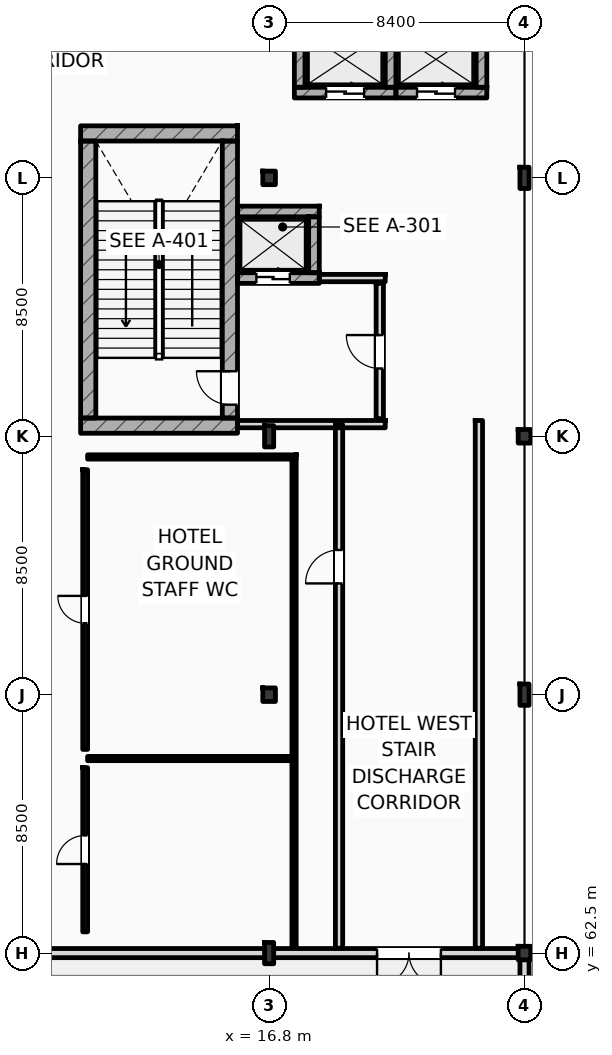
"""IFC4 building model, lengths in metres.
Left out: names, types, materials, properties, quantities, classifications, styles, units other than length and angle.
Written with IfcOpenShell. Run it as: python <this file> out.ifc"""

import sys

from ifc_helpers import new_model, si_unit, direction, frame, frame_2d, origin, origin_2d, place, context, subcontext, project, spatial, rectangle, i_section, extrude, element, fill, save


model = new_model("IFC4")
c1 = context("Model", 3, precision=1e-05, world=origin(), true_north=direction((0.0, 1.0)))
c2 = subcontext(c1, "Body", "Model", "MODEL_VIEW")
j1 = project(units=[si_unit("LENGTHUNIT", "METRE"), si_unit("PLANEANGLEUNIT", "RADIAN")], contexts=[c1])
p1 = place(None, origin())
s1 = spatial("IfcSite", under=j1, at=p1, CompositionType="ELEMENT")
p2 = place(p1, origin())
s2 = spatial("IfcBuilding", under=s1, at=p2, CompositionType="ELEMENT")
p3 = place(p2, origin())
s3 = spatial("IfcBuildingStorey", under=s2, at=p3, CompositionType="ELEMENT", Elevation=0.0)
p4 = place(p3, frame((16.8, 62.5, 0.0), z_axis=(0.0, 0.0, 1.0), x_axis=(1.0, 0.0, 0.0)))
e1 = element("IfcColumn", 1, at=p4, inside=s3, PredefinedType="COLUMN", context=c2, shape_type="SweptSolid", body=[
    extrude(i_section(OverallWidth=0.3, OverallDepth=0.7, WebThickness=0.017, FlangeThickness=0.032, FilletRadius=0.027, at=origin_2d()), origin(), (0.0, 0.0, 1.0), 6.0),
])
p5 = place(p3, frame((16.8, 71.0, 0.0), z_axis=(0.0, 0.0, 1.0), x_axis=(1.0, 0.0, 0.0)))
e2 = element("IfcColumn", 2, at=p5, inside=s3, PredefinedType="COLUMN", context=c2, shape_type="SweptSolid", body=[
    extrude(i_section(OverallWidth=0.416, OverallDepth=0.446, WebThickness=0.036, FlangeThickness=0.048, FilletRadius=0.015, at=origin_2d()), origin(), (0.0, 0.0, 1.0), 6.0),
])
p6 = place(p3, frame((16.8, 79.5, 0.0), z_axis=(0.0, 0.0, 1.0), x_axis=(1.0, 0.0, 0.0)))
e3 = element("IfcColumn", 3, at=p6, inside=s3, PredefinedType="COLUMN", context=c2, shape_type="SweptSolid", body=[
    extrude(i_section(OverallWidth=0.3, OverallDepth=0.7, WebThickness=0.017, FlangeThickness=0.032, FilletRadius=0.027, at=origin_2d()), origin(), (0.0, 0.0, 1.0), 6.0),
])
for number, where, z_axis, x_axis in (
    (4, (16.8, 88.0, 0.0), (0.0, 0.0, 1.0), (1.0, 0.0, 0.0)),
    (5, (25.2, 62.5, 0.0), (0.0, 0.0, 1.0), (1.0, 0.0, 0.0)),
):
    element("IfcColumn", number, at=place(p3, frame(where, z_axis=z_axis, x_axis=x_axis)), inside=s3, PredefinedType="COLUMN", context=c2, shape_type="SweptSolid", body=[
        extrude(i_section(OverallWidth=0.416, OverallDepth=0.446, WebThickness=0.036, FlangeThickness=0.048, FilletRadius=0.015, at=origin_2d()), origin(), (0.0, 0.0, 1.0), 6.0),
    ])
p7 = place(p3, frame((25.2, 71.0, 0.0), z_axis=(0.0, 0.0, 1.0), x_axis=(1.0, 0.0, 0.0)))
e6 = element("IfcColumn", 6, at=p7, inside=s3, PredefinedType="COLUMN", context=c2, shape_type="SweptSolid", body=[
    extrude(i_section(OverallWidth=0.3, OverallDepth=0.7, WebThickness=0.017, FlangeThickness=0.032, FilletRadius=0.027, at=origin_2d()), origin(), (0.0, 0.0, 1.0), 6.0),
])
p8 = place(p3, frame((25.2, 79.5, 0.0), z_axis=(0.0, 0.0, 1.0), x_axis=(1.0, 0.0, 0.0)))
e7 = element("IfcColumn", 7, at=p8, inside=s3, PredefinedType="COLUMN", context=c2, shape_type="SweptSolid", body=[
    extrude(i_section(OverallWidth=0.416, OverallDepth=0.446, WebThickness=0.036, FlangeThickness=0.048, FilletRadius=0.015, at=origin_2d()), origin(), (0.0, 0.0, 1.0), 6.0),
])
p9 = place(p3, frame((25.2, 88.0, 0.0), z_axis=(0.0, 0.0, 1.0), x_axis=(1.0, 0.0, 0.0)))
e8 = element("IfcColumn", 8, at=p9, inside=s3, PredefinedType="COLUMN", context=c2, shape_type="SweptSolid", body=[
    extrude(i_section(OverallWidth=0.3, OverallDepth=0.7, WebThickness=0.017, FlangeThickness=0.032, FilletRadius=0.027, at=origin_2d()), origin(), (0.0, 0.0, 1.0), 6.0),
])
for number, where, z_axis, x_axis in (
    (9, (10.6, 89.462, 0.0), (0.0, 0.0, 1.0), (1.0, 0.0, 0.0)),
    (10, (10.6, 79.85, 0.0), (0.0, 0.0, 1.0), (1.0, 0.0, 0.0)),
):
    element("IfcWall", number, at=place(p3, frame(where, z_axis=z_axis, x_axis=x_axis)), inside=s3, PredefinedType="SHEAR", context=c2, shape_type="SweptSolid", body=[
        extrude(rectangle(XDim=5.16, YDim=0.5, at=frame_2d((2.58, 0.0))), origin(), (0.0, 0.0, 1.0), 6.0),
    ])
p10 = place(p3, frame((10.85, 80.1, 0.0), z_axis=(0.0, 0.0, 1.0), x_axis=(0.0, 1.0, 0.0)))
e11 = element("IfcWall", 11, at=p10, inside=s3, PredefinedType="SHEAR", context=c2, shape_type="SweptSolid", body=[
    extrude(rectangle(XDim=9.112, YDim=0.5, at=frame_2d((4.556, 0.0))), origin(), (0.0, 0.0, 1.0), 6.0),
])
p11 = place(p3, frame((15.51, 80.1, 0.0), z_axis=(0.0, 0.0, 1.0), x_axis=(0.0, 1.0, 0.0)))
e12 = element("IfcWall", 12, at=p11, inside=s3, PredefinedType="SHEAR", context=c2, shape_type="SweptSolid", body=[
    extrude(rectangle(XDim=9.112, YDim=0.5, at=frame_2d((4.556, 0.0))), origin(), (0.0, 0.0, 1.0), 6.0),
])
p12 = place(p11, frame((0.44, 0.0, 0.0)))
e13 = element("IfcOpeningElement", 13, at=p12, cuts=e12, PredefinedType="OPENING", context=c2, shape_type="SweptSolid", body=[
    extrude(rectangle(XDim=1.1, YDim=2.2, at=frame_2d((0.55, 1.1))), frame((0.0, 0.26, 0.0), z_axis=(0.0, -1.0, 0.0), x_axis=(1.0, 0.0, 0.0)), (0.0, 0.0, 1.0), 0.52),
])
p13 = place(p3, frame((0.0, 62.5, 0.0), z_axis=(0.0, 0.0, 1.0), x_axis=(1.0, 0.0, 0.0)))
e14 = element("IfcWall", 14, at=p13, inside=s3, PredefinedType="STANDARD", context=c2, shape_type="SweptSolid", body=[
    extrude(rectangle(XDim=25.2, YDim=0.3, at=frame_2d((12.6, 0.0))), origin(), (0.0, 0.0, 1.0), 5.14),
])
p14 = place(p13, frame((20.35, 0.0, 0.0)))
e15 = element("IfcOpeningElement", 15, at=p14, cuts=e14, PredefinedType="OPENING", context=c2, shape_type="SweptSolid", body=[
    extrude(rectangle(XDim=2.1, YDim=2.4, at=frame_2d((1.05, 1.2))), frame((0.0, 0.16, 0.0), z_axis=(0.0, -1.0, 0.0), x_axis=(1.0, 0.0, 0.0)), (0.0, 0.0, 1.0), 0.32),
])
p15 = place(p3, frame((25.2, 54.0, 0.0), z_axis=(0.0, 0.0, 1.0), x_axis=(0.0, 1.0, 0.0)))
e16 = element("IfcWall", 16, at=p15, inside=s3, PredefinedType="STANDARD", context=c2, shape_type="SweptSolid", body=[
    extrude(rectangle(XDim=8.5, YDim=0.3, at=frame_2d((4.25, 0.0))), origin(), (0.0, 0.0, 1.0), 5.2),
])
p16 = place(p15, frame((3.0, 0.0, 0.0)))
e17 = element("IfcOpeningElement", 17, at=p16, cuts=e16, PredefinedType="OPENING", context=c2, shape_type="SweptSolid", body=[
    extrude(rectangle(XDim=2.2, YDim=2.5, at=frame_2d((1.1, 1.25))), frame((0.0, 0.16, 0.0), z_axis=(0.0, -1.0, 0.0), x_axis=(1.0, 0.0, 0.0)), (0.0, 0.0, 1.0), 0.32),
])
p17 = place(p3, frame((15.76, 86.895, 0.0), z_axis=(0.0, 0.0, 1.0), x_axis=(1.0, 0.0, 0.0)))
e18 = element("IfcWall", 18, at=p17, inside=s3, PredefinedType="SHEAR", context=c2, shape_type="SweptSolid", body=[
    extrude(rectangle(XDim=2.69, YDim=0.35, at=frame_2d((1.345, 0.0))), origin(), (0.0, 0.0, 1.0), 5.7),
])
p18 = place(p3, frame((15.76, 84.705, 0.0), z_axis=(0.0, 0.0, 1.0), x_axis=(1.0, 0.0, 0.0)))
e19 = element("IfcWall", 19, at=p18, inside=s3, PredefinedType="SHEAR", context=c2, shape_type="SweptSolid", body=[
    extrude(rectangle(XDim=2.69, YDim=0.35, at=frame_2d((1.345, 0.0))), origin(), (0.0, 0.0, 1.0), 5.7),
])
p19 = place(p18, frame((0.62, 0.0, 0.0)))
e20 = element("IfcOpeningElement", 20, at=p19, cuts=e19, PredefinedType="OPENING", context=c2, shape_type="SweptSolid", body=[
    extrude(rectangle(XDim=1.1, YDim=2.2, at=frame_2d((0.55, 1.1))), frame((0.0, 0.185, 0.0), z_axis=(0.0, -1.0, 0.0), x_axis=(1.0, 0.0, 0.0)), (0.0, 0.0, 1.0), 0.37),
])
p20 = place(p3, frame((18.275, 84.88, 0.0), z_axis=(0.0, 0.0, 1.0), x_axis=(0.0, 1.0, 0.0)))
e21 = element("IfcWall", 21, at=p20, inside=s3, PredefinedType="SHEAR", context=c2, shape_type="SweptSolid", body=[
    extrude(rectangle(XDim=1.84, YDim=0.35, at=frame_2d((0.92, 0.0))), origin(), (0.0, 0.0, 1.0), 5.7),
])
p21 = place(p3, frame((17.63, 90.805, 0.0), z_axis=(0.0, 0.0, 1.0), x_axis=(1.0, 0.0, 0.0)))
e22 = element("IfcWall", 22, at=p21, inside=s3, PredefinedType="SHEAR", context=c2, shape_type="SweptSolid", body=[
    extrude(rectangle(XDim=3.34, YDim=0.35, at=frame_2d((1.67, 0.0))), origin(), (0.0, 0.0, 1.0), 5.7),
])
p22 = place(p21, frame((1.045, 0.0, 0.0)))
e23 = element("IfcOpeningElement", 23, at=p22, cuts=e22, PredefinedType="OPENING", context=c2, shape_type="SweptSolid", body=[
    extrude(rectangle(XDim=1.25, YDim=2.25, at=frame_2d((0.625, 1.125))), frame((0.0, 0.185, 0.0), z_axis=(0.0, -1.0, 0.0), x_axis=(1.0, 0.0, 0.0)), (0.0, 0.0, 1.0), 0.37),
])
for number, where, z_axis, x_axis in (
    (24, (17.805, 90.98, 0.0), (0.0, 0.0, 1.0), (0.0, 1.0, 0.0)),
    (25, (20.795, 90.98, 0.0), (0.0, 0.0, 1.0), (0.0, 1.0, 0.0)),
):
    element("IfcWall", number, at=place(p3, frame(where, z_axis=z_axis, x_axis=x_axis)), inside=s3, PredefinedType="SHEAR", context=c2, shape_type="SweptSolid", body=[
        extrude(rectangle(XDim=1.84, YDim=0.35, at=frame_2d((0.92, 0.0))), origin(), (0.0, 0.0, 1.0), 5.7),
    ])
p23 = place(p3, frame((20.97, 90.805, 0.0), z_axis=(0.0, 0.0, 1.0), x_axis=(1.0, 0.0, 0.0)))
e26 = element("IfcWall", 26, at=p23, inside=s3, PredefinedType="SHEAR", context=c2, shape_type="SweptSolid", body=[
    extrude(rectangle(XDim=2.99, YDim=0.35, at=frame_2d((1.495, 0.0))), origin(), (0.0, 0.0, 1.0), 5.7),
])
p24 = place(p23, frame((0.695, 0.0, 0.0)))
e27 = element("IfcOpeningElement", 27, at=p24, cuts=e26, PredefinedType="OPENING", context=c2, shape_type="SweptSolid", body=[
    extrude(rectangle(XDim=1.25, YDim=2.25, at=frame_2d((0.625, 1.125))), frame((0.0, 0.185, 0.0), z_axis=(0.0, -1.0, 0.0), x_axis=(1.0, 0.0, 0.0)), (0.0, 0.0, 1.0), 0.37),
])
p25 = place(p3, frame((23.785, 90.98, 0.0), z_axis=(0.0, 0.0, 1.0), x_axis=(0.0, 1.0, 0.0)))
e28 = element("IfcWall", 28, at=p25, inside=s3, PredefinedType="SHEAR", context=c2, shape_type="SweptSolid", body=[
    extrude(rectangle(XDim=1.84, YDim=0.35, at=frame_2d((0.92, 0.0))), origin(), (0.0, 0.0, 1.0), 5.7),
])
p26 = place(p3, frame((15.76, 79.9, 0.0), z_axis=(0.0, 0.0, 1.0), x_axis=(1.0, 0.0, 0.0)))
e29 = element("IfcWall", 29, at=p26, inside=s3, PredefinedType="STANDARD", context=c2, shape_type="SweptSolid", body=[
    extrude(rectangle(XDim=4.86, YDim=0.24, at=frame_2d((2.43, 0.0))), origin(), (0.0, 0.0, 1.0), 5.7),
])
p27 = place(p3, frame((18.45, 84.705, 0.0), z_axis=(0.0, 0.0, 1.0), x_axis=(1.0, 0.0, 0.0)))
e30 = element("IfcWall", 30, at=p27, inside=s3, PredefinedType="STANDARD", context=c2, shape_type="SweptSolid", body=[
    extrude(rectangle(XDim=2.17, YDim=0.24, at=frame_2d((1.085, 0.0))), origin(), (0.0, 0.0, 1.0), 5.7),
])
p28 = place(p3, frame((20.44, 80.08, 0.0), z_axis=(0.0, 0.0, 1.0), x_axis=(0.0, 1.0, 0.0)))
e31 = element("IfcWall", 31, at=p28, inside=s3, PredefinedType="STANDARD", context=c2, shape_type="SweptSolid", body=[
    extrude(rectangle(XDim=4.45, YDim=0.24, at=frame_2d((2.225, 0.0))), origin(), (0.0, 0.0, 1.0), 5.7),
])
p29 = place(p28, frame((1.65, 0.0, 0.0)))
e32 = element("IfcOpeningElement", 32, at=p29, cuts=e31, PredefinedType="OPENING", context=c2, shape_type="SweptSolid", body=[
    extrude(rectangle(XDim=1.1, YDim=2.2, at=frame_2d((0.55, 1.1))), frame((0.0, 0.13, 0.0), z_axis=(0.0, -1.0, 0.0), x_axis=(1.0, 0.0, 0.0)), (0.0, 0.0, 1.0), 0.26),
])
p30 = place(p3, frame((10.75, 63.2, 0.0), z_axis=(0.0, 0.0, 1.0), x_axis=(0.0, 1.0, 0.0)))
e33 = element("IfcWall", 33, at=p30, inside=s3, PredefinedType="PARTITIONING", context=c2, shape_type="SweptSolid", body=[
    extrude(rectangle(XDim=5.4, YDim=0.16, at=frame_2d((2.7, 0.0))), origin(), (0.0, 0.0, 1.0), 5.7),
])
p31 = place(p30, frame((2.23, 0.0, 0.0)))
e34 = element("IfcOpeningElement", 34, at=p31, cuts=e33, PredefinedType="OPENING", context=c2, shape_type="SweptSolid", body=[
    extrude(rectangle(XDim=0.94, YDim=2.15, at=frame_2d((0.47, 1.075))), frame((0.0, 0.09, 0.0), z_axis=(0.0, -1.0, 0.0), x_axis=(1.0, 0.0, 0.0)), (0.0, 0.0, 1.0), 0.18),
])
p32 = place(p3, frame((10.75, 69.2, 0.0), z_axis=(0.0, 0.0, 1.0), x_axis=(0.0, 1.0, 0.0)))
e35 = element("IfcWall", 35, at=p32, inside=s3, PredefinedType="PARTITIONING", context=c2, shape_type="SweptSolid", body=[
    extrude(rectangle(XDim=9.2, YDim=0.16, at=frame_2d((4.6, 0.0))), origin(), (0.0, 0.0, 1.0), 5.7),
])
p33 = place(p32, frame((4.15, 0.0, 0.0)))
e36 = element("IfcOpeningElement", 36, at=p33, cuts=e35, PredefinedType="OPENING", context=c2, shape_type="SweptSolid", body=[
    extrude(rectangle(XDim=0.9, YDim=2.1, at=frame_2d((0.45, 1.05))), frame((0.0, 0.09, 0.0), z_axis=(0.0, -1.0, 0.0), x_axis=(1.0, 0.0, 0.0)), (0.0, 0.0, 1.0), 0.18),
])
p34 = place(p3, frame((10.83, 68.9, 0.0), z_axis=(0.0, 0.0, 1.0), x_axis=(1.0, 0.0, 0.0)))
e37 = element("IfcWall", 37, at=p34, inside=s3, PredefinedType="PARTITIONING", context=c2, shape_type="SweptSolid", body=[
    extrude(rectangle(XDim=6.72, YDim=0.14, at=frame_2d((3.36, 0.0))), origin(), (0.0, 0.0, 1.0), 5.7),
])
p35 = place(p3, frame((17.62, 62.7, 0.0), z_axis=(0.0, 0.0, 1.0), x_axis=(0.0, 1.0, 0.0)))
e38 = element("IfcWall", 38, at=p35, inside=s3, PredefinedType="PARTITIONING", context=c2, shape_type="SweptSolid", body=[
    extrude(rectangle(XDim=16.05, YDim=0.14, at=frame_2d((8.025, 0.0))), origin(), (0.0, 0.0, 1.0), 5.7),
])
p36 = place(p3, frame((10.83, 78.82, 0.0), z_axis=(0.0, 0.0, 1.0), x_axis=(1.0, 0.0, 0.0)))
e39 = element("IfcWall", 39, at=p36, inside=s3, PredefinedType="PARTITIONING", context=c2, shape_type="SweptSolid", body=[
    extrude(rectangle(XDim=6.86, YDim=0.14, at=frame_2d((3.43, 0.0))), origin(), (0.0, 0.0, 1.0), 5.7),
])
p37 = place(p3, frame((19.1, 62.66, 0.0), z_axis=(0.0, 0.0, 1.0), x_axis=(0.0, 1.0, 0.0)))
e40 = element("IfcWall", 40, at=p37, inside=s3, PredefinedType="STANDARD", context=c2, shape_type="SweptSolid", body=[
    extrude(rectangle(XDim=17.22, YDim=0.24, at=frame_2d((8.61, 0.0))), origin(), (0.0, 0.0, 1.0), 5.7),
])
p38 = place(p37, frame((12.0, 0.0, 0.0)))
e41 = element("IfcOpeningElement", 41, at=p38, cuts=e40, PredefinedType="OPENING", context=c2, shape_type="SweptSolid", body=[
    extrude(rectangle(XDim=1.1, YDim=2.2, at=frame_2d((0.55, 1.1))), frame((0.0, 0.13, 0.0), z_axis=(0.0, -1.0, 0.0), x_axis=(1.0, 0.0, 0.0)), (0.0, 0.0, 1.0), 0.26),
])
p39 = place(p3, frame((23.7, 62.66, 0.0), z_axis=(0.0, 0.0, 1.0), x_axis=(0.0, 1.0, 0.0)))
e42 = element("IfcWall", 42, at=p39, inside=s3, PredefinedType="STANDARD", context=c2, shape_type="SweptSolid", body=[
    extrude(rectangle(XDim=17.36, YDim=0.24, at=frame_2d((8.68, 0.0))), origin(), (0.0, 0.0, 1.0), 5.7),
])
p40 = place(p14, frame((2.1, 0.0, 0.0), z_axis=(0.0, 0.0, 1.0), x_axis=(-1.0, 0.0, 0.0)))
e43 = element("IfcDoor", 43, at=p40, inside=s3, OperationType="DOUBLE_SWING_LEFT", PredefinedType="DOOR", context=c2, shape_type="SweptSolid", body=[
    extrude(rectangle(XDim=2.1, YDim=2.4, at=frame_2d((1.05, 1.2))), frame((0.0, 0.025, 0.0), z_axis=(0.0, -1.0, 0.0), x_axis=(1.0, 0.0, 0.0)), (0.0, 0.0, 1.0), 0.05),
])
fill(e15, e43)
p41 = place(p12, origin())
e44 = element("IfcDoor", 44, at=p41, inside=s3, OperationType="SINGLE_SWING_RIGHT", PredefinedType="DOOR", context=c2, shape_type="SweptSolid", body=[
    extrude(rectangle(XDim=1.1, YDim=2.2, at=frame_2d((0.55, 1.1))), frame((0.0, 0.025, 0.0), z_axis=(0.0, -1.0, 0.0), x_axis=(1.0, 0.0, 0.0)), (0.0, 0.0, 1.0), 0.05),
])
fill(e13, e44)
p42 = place(p19, origin())
e45 = element("IfcDoor", 45, at=p42, inside=s3, OperationType="SLIDING_TO_LEFT", PredefinedType="DOOR", context=c2, shape_type="SweptSolid", body=[
    extrude(rectangle(XDim=1.1, YDim=2.2, at=frame_2d((0.55, 1.1))), frame((0.0, 0.025, 0.0), z_axis=(0.0, -1.0, 0.0), x_axis=(1.0, 0.0, 0.0)), (0.0, 0.0, 1.0), 0.05),
])
fill(e20, e45)
p43 = place(p22, origin())
e46 = element("IfcDoor", 46, at=p43, inside=s3, OperationType="SLIDING_TO_LEFT", PredefinedType="DOOR", context=c2, shape_type="SweptSolid", body=[
    extrude(rectangle(XDim=1.25, YDim=2.25, at=frame_2d((0.625, 1.125))), frame((0.0, 0.025, 0.0), z_axis=(0.0, -1.0, 0.0), x_axis=(1.0, 0.0, 0.0)), (0.0, 0.0, 1.0), 0.05),
])
fill(e23, e46)
p44 = place(p24, origin())
e47 = element("IfcDoor", 47, at=p44, inside=s3, OperationType="SLIDING_TO_LEFT", PredefinedType="DOOR", context=c2, shape_type="SweptSolid", body=[
    extrude(rectangle(XDim=1.25, YDim=2.25, at=frame_2d((0.625, 1.125))), frame((0.0, 0.025, 0.0), z_axis=(0.0, -1.0, 0.0), x_axis=(1.0, 0.0, 0.0)), (0.0, 0.0, 1.0), 0.05),
])
fill(e27, e47)
p45 = place(p29, origin())
e48 = element("IfcDoor", 48, at=p45, inside=s3, OperationType="SINGLE_SWING_RIGHT", PredefinedType="DOOR", context=c2, shape_type="SweptSolid", body=[
    extrude(rectangle(XDim=1.1, YDim=2.2, at=frame_2d((0.55, 1.1))), frame((0.0, 0.025, 0.0), z_axis=(0.0, -1.0, 0.0), x_axis=(1.0, 0.0, 0.0)), (0.0, 0.0, 1.0), 0.05),
])
fill(e32, e48)
p46 = place(p31, origin())
e49 = element("IfcDoor", 49, at=p46, inside=s3, OperationType="SINGLE_SWING_LEFT", PredefinedType="DOOR", context=c2, shape_type="SweptSolid", body=[
    extrude(rectangle(XDim=0.94, YDim=2.15, at=frame_2d((0.47, 1.075))), frame((0.0, 0.025, 0.0), z_axis=(0.0, -1.0, 0.0), x_axis=(1.0, 0.0, 0.0)), (0.0, 0.0, 1.0), 0.05),
])
fill(e34, e49)
p47 = place(p33, origin())
e50 = element("IfcDoor", 50, at=p47, inside=s3, OperationType="SINGLE_SWING_RIGHT", PredefinedType="DOOR", context=c2, shape_type="SweptSolid", body=[
    extrude(rectangle(XDim=0.9, YDim=2.1, at=frame_2d((0.45, 1.05))), frame((0.0, 0.025, 0.0), z_axis=(0.0, -1.0, 0.0), x_axis=(1.0, 0.0, 0.0)), (0.0, 0.0, 1.0), 0.05),
])
fill(e36, e50)
p48 = place(p38, origin())
e51 = element("IfcDoor", 51, at=p48, inside=s3, OperationType="SINGLE_SWING_LEFT", PredefinedType="DOOR", context=c2, shape_type="SweptSolid", body=[
    extrude(rectangle(XDim=1.1, YDim=2.2, at=frame_2d((0.55, 1.1))), frame((0.0, 0.025, 0.0), z_axis=(0.0, -1.0, 0.0), x_axis=(1.0, 0.0, 0.0)), (0.0, 0.0, 1.0), 0.05),
])
fill(e41, e51)
save(model, sys.argv[1])
